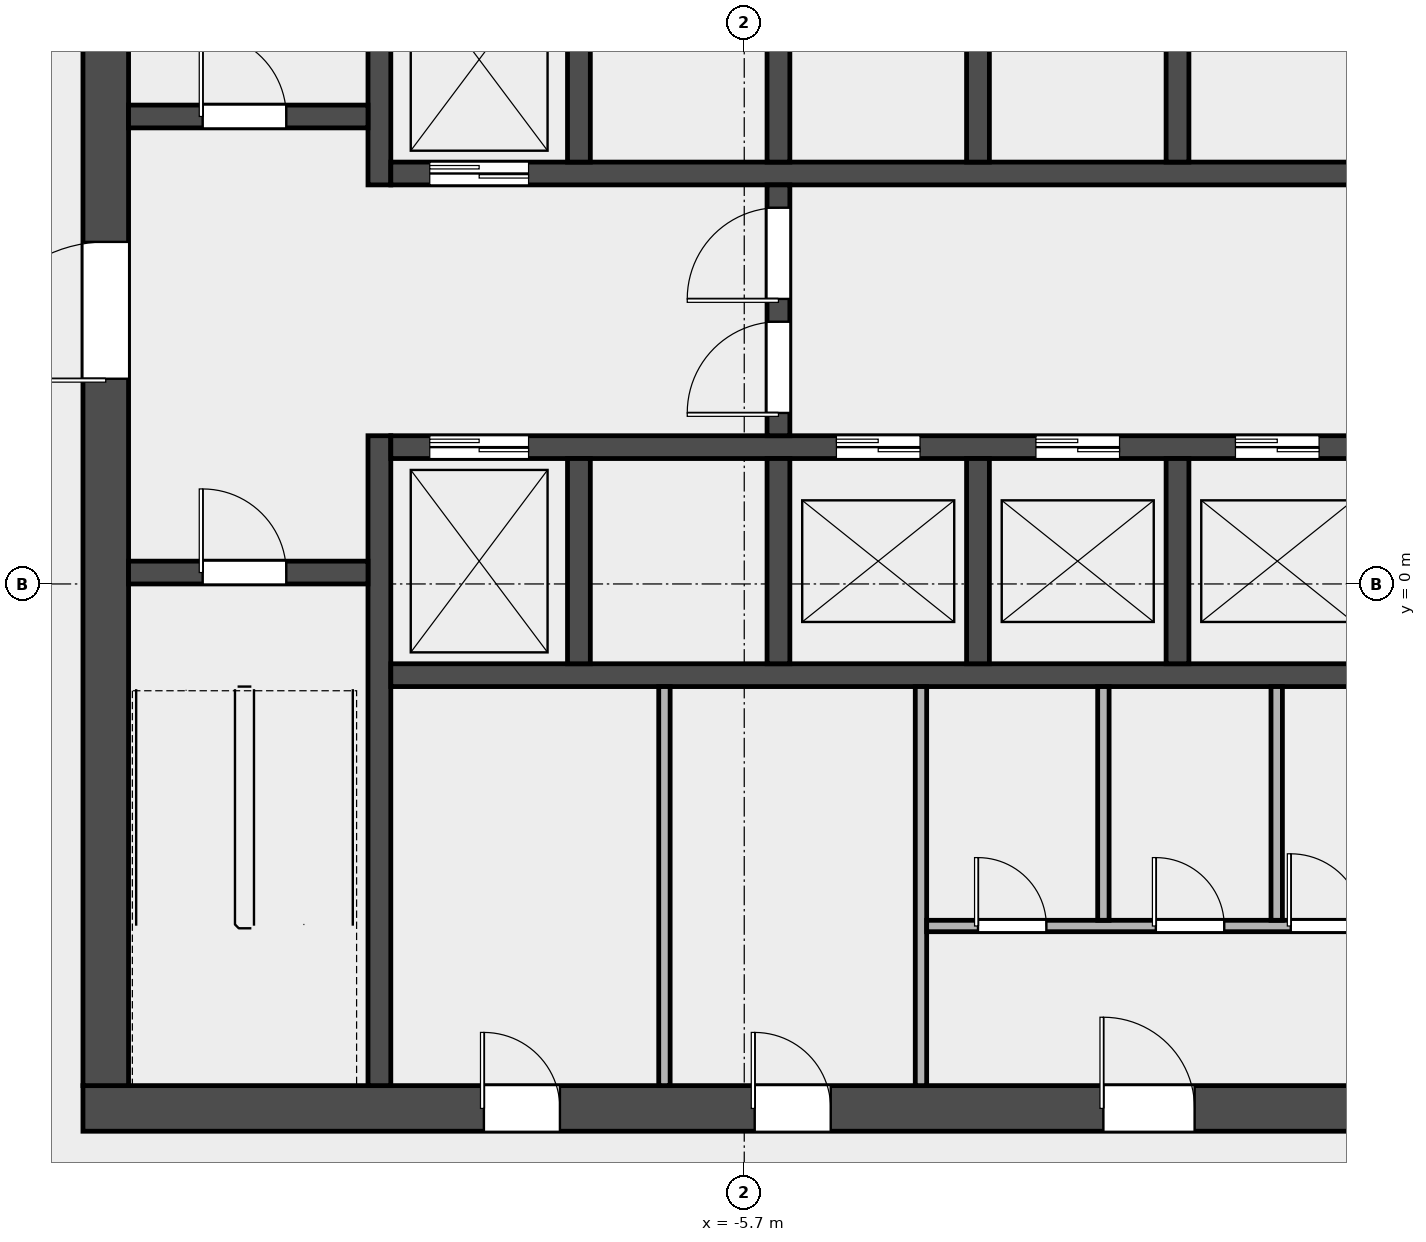
"""IFC4 building model, lengths in metres.
Left out: names, types, materials, properties, quantities, classifications, styles, units other than length and angle.
Written with IfcOpenShell. Run it as: python <this file> out.ifc"""

import sys

from ifc_helpers import new_model, si_unit, direction, frame, frame_2d, origin, place, context, subcontext, project, spatial, rectangle, extrude, element, fill, save


model = new_model("IFC4")
c1 = context("Model", 3, precision=1e-05, world=origin(), true_north=direction((0.0, 1.0)))
c2 = subcontext(c1, "Body", "Model", "MODEL_VIEW")
j1 = project(units=[si_unit("LENGTHUNIT", "METRE"), si_unit("PLANEANGLEUNIT", "RADIAN")], contexts=[c1])
p1 = place(None, origin())
s1 = spatial("IfcSite", under=j1, at=p1, CompositionType="ELEMENT")
p2 = place(p1, origin())
s2 = spatial("IfcBuilding", under=s1, at=p2, CompositionType="ELEMENT")
p3 = place(p2, frame((0.0, 0.0, 169.0)))
s3 = spatial("IfcBuildingStorey", under=s2, at=p3, CompositionType="ELEMENT", Elevation=169.0)
p4 = place(p3, frame((-14.4, -6.9, 0.0), z_axis=(0.0, 0.0, 1.0), x_axis=(1.0, 0.0, 0.0)))
e1 = element("IfcWall", 1, at=p4, inside=s3, PredefinedType="SHEAR", context=c2, shape_type="SweptSolid", body=[
    extrude(rectangle(XDim=28.8, YDim=0.6, at=frame_2d((14.4, 0.0))), origin(), (0.0, 0.0, 1.0), 3.7),
])
p5 = place(p4, frame((5.275, 0.0, 0.0)))
e2 = element("IfcOpeningElement", 2, at=p5, cuts=e1, PredefinedType="OPENING", context=c2, shape_type="SweptSolid", body=[
    extrude(rectangle(XDim=1.0, YDim=2.1, at=frame_2d((0.5, 1.05))), frame((0.0, 0.312, 0.0), z_axis=(0.0, -1.0, 0.0), x_axis=(1.0, 0.0, 0.0)), (0.0, 0.0, 1.0), 0.624),
])
p6 = place(p4, frame((8.837, 0.0, 0.0)))
e3 = element("IfcOpeningElement", 3, at=p6, cuts=e1, PredefinedType="OPENING", context=c2, shape_type="SweptSolid", body=[
    extrude(rectangle(XDim=1.0, YDim=2.1, at=frame_2d((0.5, 1.05))), frame((0.0, 0.312, 0.0), z_axis=(0.0, -1.0, 0.0), x_axis=(1.0, 0.0, 0.0)), (0.0, 0.0, 1.0), 0.624),
])
p7 = place(p4, frame((13.425, 0.0, 0.0)))
e4 = element("IfcOpeningElement", 4, at=p7, cuts=e1, PredefinedType="OPENING", context=c2, shape_type="SweptSolid", body=[
    extrude(rectangle(XDim=1.2, YDim=2.1, at=frame_2d((0.6, 1.05))), frame((0.0, 0.312, 0.0), z_axis=(0.0, -1.0, 0.0), x_axis=(1.0, 0.0, 0.0)), (0.0, 0.0, 1.0), 0.624),
])
p8 = place(p4, frame((18.75, 0.0, 0.0)))
e5 = element("IfcOpeningElement", 5, at=p8, cuts=e1, PredefinedType="OPENING", context=c2, shape_type="SweptSolid", body=[
    extrude(rectangle(XDim=1.8, YDim=2.1, at=frame_2d((0.9, 1.05))), frame((0.0, 0.312, 0.0), z_axis=(0.0, -1.0, 0.0), x_axis=(1.0, 0.0, 0.0)), (0.0, 0.0, 1.0), 0.624),
])
p9 = place(p4, frame((23.087, 0.0, 0.0)))
e6 = element("IfcOpeningElement", 6, at=p9, cuts=e1, PredefinedType="OPENING", context=c2, shape_type="SweptSolid", body=[
    extrude(rectangle(XDim=1.0, YDim=2.1, at=frame_2d((0.5, 1.05))), frame((0.0, 0.312, 0.0), z_axis=(0.0, -1.0, 0.0), x_axis=(1.0, 0.0, 0.0)), (0.0, 0.0, 1.0), 0.624),
])
p10 = place(p3, frame((-14.1, -6.6, 0.0), z_axis=(0.0, 0.0, 1.0), x_axis=(0.0, 1.0, 0.0)))
e7 = element("IfcWall", 7, at=p10, inside=s3, PredefinedType="SHEAR", context=c2, shape_type="SweptSolid", body=[
    extrude(rectangle(XDim=19.5, YDim=0.6, at=frame_2d((9.75, 0.0))), origin(), (0.0, 0.0, 1.0), 3.7),
])
p11 = place(p10, frame((9.3, 0.0, 0.0)))
e8 = element("IfcOpeningElement", 8, at=p11, cuts=e7, PredefinedType="OPENING", context=c2, shape_type="SweptSolid", body=[
    extrude(rectangle(XDim=1.8, YDim=2.1, at=frame_2d((0.9, 1.05))), frame((0.0, 0.312, 0.0), z_axis=(0.0, -1.0, 0.0), x_axis=(1.0, 0.0, 0.0)), (0.0, 0.0, 1.0), 0.624),
])
p12 = place(p3, frame((-10.5, -6.6, 0.0), z_axis=(0.0, 0.0, 1.0), x_axis=(0.0, 1.0, 0.0)))
e9 = element("IfcWall", 9, at=p12, inside=s3, PredefinedType="SHEAR", context=c2, shape_type="SweptSolid", body=[
    extrude(rectangle(XDim=8.55, YDim=0.3, at=frame_2d((4.275, 0.0))), origin(), (0.0, 0.0, 1.0), 3.7),
])
p13 = place(p3, frame((-10.5, 5.25, 0.0), z_axis=(0.0, 0.0, 1.0), x_axis=(0.0, 1.0, 0.0)))
e10 = element("IfcWall", 10, at=p13, inside=s3, PredefinedType="SHEAR", context=c2, shape_type="SweptSolid", body=[
    extrude(rectangle(XDim=7.65, YDim=0.3, at=frame_2d((3.825, 0.0))), origin(), (0.0, 0.0, 1.0), 3.7),
])
p14 = place(p3, frame((-13.8, 0.15, 0.0), z_axis=(0.0, 0.0, 1.0), x_axis=(1.0, 0.0, 0.0)))
e11 = element("IfcWall", 11, at=p14, inside=s3, PredefinedType="SOLIDWALL", context=c2, shape_type="SweptSolid", body=[
    extrude(rectangle(XDim=3.15, YDim=0.3, at=frame_2d((1.575, 0.0))), origin(), (0.0, 0.0, 1.0), 3.7),
])
p15 = place(p14, frame((0.975, 0.0, 0.0)))
e12 = element("IfcOpeningElement", 12, at=p15, cuts=e11, PredefinedType="OPENING", context=c2, shape_type="SweptSolid", body=[
    extrude(rectangle(XDim=1.1, YDim=2.1, at=frame_2d((0.55, 1.05))), frame((0.0, 0.162, 0.0), z_axis=(0.0, -1.0, 0.0), x_axis=(1.0, 0.0, 0.0)), (0.0, 0.0, 1.0), 0.324),
])
p16 = place(p3, frame((-13.8, 6.15, 0.0), z_axis=(0.0, 0.0, 1.0), x_axis=(1.0, 0.0, 0.0)))
e13 = element("IfcWall", 13, at=p16, inside=s3, PredefinedType="SOLIDWALL", context=c2, shape_type="SweptSolid", body=[
    extrude(rectangle(XDim=3.15, YDim=0.3, at=frame_2d((1.575, 0.0))), origin(), (0.0, 0.0, 1.0), 3.7),
])
p17 = place(p16, frame((0.975, 0.0, 0.0)))
e14 = element("IfcOpeningElement", 14, at=p17, cuts=e13, PredefinedType="OPENING", context=c2, shape_type="SweptSolid", body=[
    extrude(rectangle(XDim=1.1, YDim=2.1, at=frame_2d((0.55, 1.05))), frame((0.0, 0.162, 0.0), z_axis=(0.0, -1.0, 0.0), x_axis=(1.0, 0.0, 0.0)), (0.0, 0.0, 1.0), 0.324),
])
p18 = place(p3, frame((-10.35, -1.2, 0.0), z_axis=(0.0, 0.0, 1.0), x_axis=(1.0, 0.0, 0.0)))
e15 = element("IfcWall", 15, at=p18, inside=s3, PredefinedType="SOLIDWALL", context=c2, shape_type="SweptSolid", body=[
    extrude(rectangle(XDim=20.7, YDim=0.3, at=frame_2d((10.35, 0.0))), origin(), (0.0, 0.0, 1.0), 3.7),
])
p19 = place(p3, frame((-10.35, 1.8, 0.0), z_axis=(0.0, 0.0, 1.0), x_axis=(1.0, 0.0, 0.0)))
e16 = element("IfcWall", 16, at=p19, inside=s3, PredefinedType="SOLIDWALL", context=c2, shape_type="SweptSolid", body=[
    extrude(rectangle(XDim=20.7, YDim=0.3, at=frame_2d((10.35, 0.0))), origin(), (0.0, 0.0, 1.0), 3.7),
])
p20 = place(p19, frame((0.512, 0.0, 0.0)))
e17 = element("IfcOpeningElement", 17, at=p20, cuts=e16, PredefinedType="OPENING", context=c2, shape_type="SweptSolid", body=[
    extrude(rectangle(XDim=1.3, YDim=2.1, at=frame_2d((0.65, 1.05))), frame((0.0, 0.162, 0.0), z_axis=(0.0, -1.0, 0.0), x_axis=(1.0, 0.0, 0.0)), (0.0, 0.0, 1.0), 0.324),
])
p21 = place(p19, frame((5.863, 0.0, 0.0)))
e18 = element("IfcOpeningElement", 18, at=p21, cuts=e16, PredefinedType="OPENING", context=c2, shape_type="SweptSolid", body=[
    extrude(rectangle(XDim=1.1, YDim=2.1, at=frame_2d((0.55, 1.05))), frame((0.0, 0.162, 0.0), z_axis=(0.0, -1.0, 0.0), x_axis=(1.0, 0.0, 0.0)), (0.0, 0.0, 1.0), 0.324),
])
p22 = place(p19, frame((8.488, 0.0, 0.0)))
e19 = element("IfcOpeningElement", 19, at=p22, cuts=e16, PredefinedType="OPENING", context=c2, shape_type="SweptSolid", body=[
    extrude(rectangle(XDim=1.1, YDim=2.1, at=frame_2d((0.55, 1.05))), frame((0.0, 0.162, 0.0), z_axis=(0.0, -1.0, 0.0), x_axis=(1.0, 0.0, 0.0)), (0.0, 0.0, 1.0), 0.324),
])
p23 = place(p19, frame((11.113, 0.0, 0.0)))
e20 = element("IfcOpeningElement", 20, at=p23, cuts=e16, PredefinedType="OPENING", context=c2, shape_type="SweptSolid", body=[
    extrude(rectangle(XDim=1.1, YDim=2.1, at=frame_2d((0.55, 1.05))), frame((0.0, 0.162, 0.0), z_axis=(0.0, -1.0, 0.0), x_axis=(1.0, 0.0, 0.0)), (0.0, 0.0, 1.0), 0.324),
])
p24 = place(p19, frame((13.738, 0.0, 0.0)))
e21 = element("IfcOpeningElement", 21, at=p24, cuts=e16, PredefinedType="OPENING", context=c2, shape_type="SweptSolid", body=[
    extrude(rectangle(XDim=1.1, YDim=2.1, at=frame_2d((0.55, 1.05))), frame((0.0, 0.162, 0.0), z_axis=(0.0, -1.0, 0.0), x_axis=(1.0, 0.0, 0.0)), (0.0, 0.0, 1.0), 0.324),
])
p25 = place(p19, frame((16.363, 0.0, 0.0)))
e22 = element("IfcOpeningElement", 22, at=p25, cuts=e16, PredefinedType="OPENING", context=c2, shape_type="SweptSolid", body=[
    extrude(rectangle(XDim=1.1, YDim=2.1, at=frame_2d((0.55, 1.05))), frame((0.0, 0.162, 0.0), z_axis=(0.0, -1.0, 0.0), x_axis=(1.0, 0.0, 0.0)), (0.0, 0.0, 1.0), 0.324),
])
p26 = place(p19, frame((18.988, 0.0, 0.0)))
e23 = element("IfcOpeningElement", 23, at=p26, cuts=e16, PredefinedType="OPENING", context=c2, shape_type="SweptSolid", body=[
    extrude(rectangle(XDim=1.1, YDim=2.1, at=frame_2d((0.55, 1.05))), frame((0.0, 0.162, 0.0), z_axis=(0.0, -1.0, 0.0), x_axis=(1.0, 0.0, 0.0)), (0.0, 0.0, 1.0), 0.324),
])
p27 = place(p3, frame((-10.35, 5.4, 0.0), z_axis=(0.0, 0.0, 1.0), x_axis=(1.0, 0.0, 0.0)))
e24 = element("IfcWall", 24, at=p27, inside=s3, PredefinedType="SOLIDWALL", context=c2, shape_type="SweptSolid", body=[
    extrude(rectangle(XDim=20.7, YDim=0.3, at=frame_2d((10.35, 0.0))), origin(), (0.0, 0.0, 1.0), 3.7),
])
p28 = place(p27, frame((0.512, 0.0, 0.0)))
e25 = element("IfcOpeningElement", 25, at=p28, cuts=e24, PredefinedType="OPENING", context=c2, shape_type="SweptSolid", body=[
    extrude(rectangle(XDim=1.3, YDim=2.1, at=frame_2d((0.65, 1.05))), frame((0.0, 0.162, 0.0), z_axis=(0.0, -1.0, 0.0), x_axis=(1.0, 0.0, 0.0)), (0.0, 0.0, 1.0), 0.324),
])
for number, where, z_axis, x_axis in (
    (26, (-7.875, -1.05, 0.0), (0.0, 0.0, 1.0), (0.0, 1.0, 0.0)),
    (27, (-5.25, -1.05, 0.0), (0.0, 0.0, 1.0), (0.0, 1.0, 0.0)),
    (28, (-2.625, -1.05, 0.0), (0.0, 0.0, 1.0), (0.0, 1.0, 0.0)),
    (29, (0.0, -1.05, 0.0), (0.0, 0.0, 1.0), (0.0, 1.0, 0.0)),
    (30, (-7.875, 5.55, 0.0), (0.0, 0.0, 1.0), (0.0, 1.0, 0.0)),
    (31, (-5.25, 5.55, 0.0), (0.0, 0.0, 1.0), (0.0, 1.0, 0.0)),
    (32, (-2.625, 5.55, 0.0), (0.0, 0.0, 1.0), (0.0, 1.0, 0.0)),
    (33, (0.0, 5.55, 0.0), (0.0, 0.0, 1.0), (0.0, 1.0, 0.0)),
):
    element("IfcWall", number, at=place(p3, frame(where, z_axis=z_axis, x_axis=x_axis)), inside=s3, PredefinedType="SOLIDWALL", context=c2, shape_type="SweptSolid", body=[
        extrude(rectangle(XDim=2.7, YDim=0.3, at=frame_2d((1.35, 0.0))), origin(), (0.0, 0.0, 1.0), 3.7),
    ])
p29 = place(p3, frame((-5.25, 1.95, 0.0), z_axis=(0.0, 0.0, 1.0), x_axis=(0.0, 1.0, 0.0)))
e34 = element("IfcWall", 34, at=p29, inside=s3, PredefinedType="SOLIDWALL", context=c2, shape_type="SweptSolid", body=[
    extrude(rectangle(XDim=3.3, YDim=0.3, at=frame_2d((1.65, 0.0))), origin(), (0.0, 0.0, 1.0), 3.7),
])
p30 = place(p29, frame((0.3, 0.0, 0.0)))
e35 = element("IfcOpeningElement", 35, at=p30, cuts=e34, PredefinedType="OPENING", context=c2, shape_type="SweptSolid", body=[
    extrude(rectangle(XDim=1.2, YDim=2.1, at=frame_2d((0.6, 1.05))), frame((0.0, 0.162, 0.0), z_axis=(0.0, -1.0, 0.0), x_axis=(1.0, 0.0, 0.0)), (0.0, 0.0, 1.0), 0.324),
])
p31 = place(p29, frame((1.8, 0.0, 0.0)))
e36 = element("IfcOpeningElement", 36, at=p31, cuts=e34, PredefinedType="OPENING", context=c2, shape_type="SweptSolid", body=[
    extrude(rectangle(XDim=1.2, YDim=2.1, at=frame_2d((0.6, 1.05))), frame((0.0, 0.162, 0.0), z_axis=(0.0, -1.0, 0.0), x_axis=(1.0, 0.0, 0.0)), (0.0, 0.0, 1.0), 0.324),
])
for number, where, z_axis, x_axis in (
    (37, (-6.75, -6.6, 0.0), (0.0, 0.0, 1.0), (0.0, 1.0, 0.0)),
    (38, (-3.375, -6.6, 0.0), (0.0, 0.0, 1.0), (0.0, 1.0, 0.0)),
):
    element("IfcWall", number, at=place(p3, frame(where, z_axis=z_axis, x_axis=x_axis)), inside=s3, PredefinedType="PARTITIONING", context=c2, shape_type="SweptSolid", body=[
        extrude(rectangle(XDim=5.25, YDim=0.15, at=frame_2d((2.625, 0.0))), origin(), (0.0, 0.0, 1.0), 3.7),
    ])
p32 = place(p3, frame((-3.3, -4.5, 0.0), z_axis=(0.0, 0.0, 1.0), x_axis=(1.0, 0.0, 0.0)))
e39 = element("IfcWall", 39, at=p32, inside=s3, PredefinedType="PARTITIONING", context=c2, shape_type="SweptSolid", body=[
    extrude(rectangle(XDim=5.775, YDim=0.15, at=frame_2d((2.888, 0.0))), origin(), (0.0, 0.0, 1.0), 3.7),
])
p33 = place(p32, frame((0.675, 0.0, 0.0)))
e40 = element("IfcOpeningElement", 40, at=p33, cuts=e39, PredefinedType="OPENING", context=c2, shape_type="SweptSolid", body=[
    extrude(rectangle(XDim=0.9, YDim=2.1, at=frame_2d((0.45, 1.05))), frame((0.0, 0.087, 0.0), z_axis=(0.0, -1.0, 0.0), x_axis=(1.0, 0.0, 0.0)), (0.0, 0.0, 1.0), 0.174),
])
p34 = place(p32, frame((3.015, 0.0, 0.0)))
e41 = element("IfcOpeningElement", 41, at=p34, cuts=e39, PredefinedType="OPENING", context=c2, shape_type="SweptSolid", body=[
    extrude(rectangle(XDim=0.9, YDim=2.1, at=frame_2d((0.45, 1.05))), frame((0.0, 0.087, 0.0), z_axis=(0.0, -1.0, 0.0), x_axis=(1.0, 0.0, 0.0)), (0.0, 0.0, 1.0), 0.174),
])
p35 = place(p32, frame((4.79, 0.0, 0.0)))
e42 = element("IfcOpeningElement", 42, at=p35, cuts=e39, PredefinedType="OPENING", context=c2, shape_type="SweptSolid", body=[
    extrude(rectangle(XDim=0.95, YDim=2.1, at=frame_2d((0.475, 1.05))), frame((0.0, 0.087, 0.0), z_axis=(0.0, -1.0, 0.0), x_axis=(1.0, 0.0, 0.0)), (0.0, 0.0, 1.0), 0.174),
])
for number, where, z_axis, x_axis in (
    (43, (-0.975, -4.425, 0.0), (0.0, 0.0, 1.0), (0.0, 1.0, 0.0)),
    (44, (1.305, -4.425, 0.0), (0.0, 0.0, 1.0), (0.0, 1.0, 0.0)),
):
    element("IfcWall", number, at=place(p3, frame(where, z_axis=z_axis, x_axis=x_axis)), inside=s3, PredefinedType="PARTITIONING", context=c2, shape_type="SweptSolid", body=[
        extrude(rectangle(XDim=3.075, YDim=0.15, at=frame_2d((1.538, 0.0))), origin(), (0.0, 0.0, 1.0), 3.7),
    ])
p36 = place(p15, origin())
e45 = element("IfcDoor", 45, at=p36, inside=s3, OperationType="SINGLE_SWING_LEFT", PredefinedType="DOOR", context=c2, shape_type="SweptSolid", body=[
    extrude(rectangle(XDim=1.1, YDim=2.1, at=frame_2d((0.55, 1.05))), frame((0.0, 0.025, 0.0), z_axis=(0.0, -1.0, 0.0), x_axis=(1.0, 0.0, 0.0)), (0.0, 0.0, 1.0), 0.05),
])
fill(e12, e45)
p37 = place(p17, origin())
e46 = element("IfcDoor", 46, at=p37, inside=s3, OperationType="SINGLE_SWING_LEFT", PredefinedType="DOOR", context=c2, shape_type="SweptSolid", body=[
    extrude(rectangle(XDim=1.1, YDim=2.1, at=frame_2d((0.55, 1.05))), frame((0.0, 0.025, 0.0), z_axis=(0.0, -1.0, 0.0), x_axis=(1.0, 0.0, 0.0)), (0.0, 0.0, 1.0), 0.05),
])
fill(e14, e46)
p38 = place(p11, origin())
e47 = element("IfcDoor", 47, at=p38, inside=s3, OperationType="DOUBLE_DOOR_SINGLE_SWING", PredefinedType="DOOR", context=c2, shape_type="SweptSolid", body=[
    extrude(rectangle(XDim=1.8, YDim=2.1, at=frame_2d((0.9, 1.05))), frame((0.0, 0.025, 0.0), z_axis=(0.0, -1.0, 0.0), x_axis=(1.0, 0.0, 0.0)), (0.0, 0.0, 1.0), 0.05),
])
fill(e8, e47)
p39 = place(p30, origin())
e48 = element("IfcDoor", 48, at=p39, inside=s3, OperationType="SINGLE_SWING_LEFT", PredefinedType="DOOR", context=c2, shape_type="SweptSolid", body=[
    extrude(rectangle(XDim=1.2, YDim=2.1, at=frame_2d((0.6, 1.05))), frame((0.0, 0.025, 0.0), z_axis=(0.0, -1.0, 0.0), x_axis=(1.0, 0.0, 0.0)), (0.0, 0.0, 1.0), 0.05),
])
fill(e35, e48)
p40 = place(p31, origin())
e49 = element("IfcDoor", 49, at=p40, inside=s3, OperationType="SINGLE_SWING_RIGHT", PredefinedType="DOOR", context=c2, shape_type="SweptSolid", body=[
    extrude(rectangle(XDim=1.2, YDim=2.1, at=frame_2d((0.6, 1.05))), frame((0.0, 0.025, 0.0), z_axis=(0.0, -1.0, 0.0), x_axis=(1.0, 0.0, 0.0)), (0.0, 0.0, 1.0), 0.05),
])
fill(e36, e49)
p41 = place(p20, origin())
e50 = element("IfcDoor", 50, at=p41, inside=s3, OperationType="DOUBLE_DOOR_SLIDING", PredefinedType="DOOR", context=c2, shape_type="SweptSolid", body=[
    extrude(rectangle(XDim=1.3, YDim=2.1, at=frame_2d((0.65, 1.05))), frame((0.0, 0.025, 0.0), z_axis=(0.0, -1.0, 0.0), x_axis=(1.0, 0.0, 0.0)), (0.0, 0.0, 1.0), 0.05),
])
fill(e17, e50)
p42 = place(p21, origin())
e51 = element("IfcDoor", 51, at=p42, inside=s3, OperationType="DOUBLE_DOOR_SLIDING", PredefinedType="DOOR", context=c2, shape_type="SweptSolid", body=[
    extrude(rectangle(XDim=1.1, YDim=2.1, at=frame_2d((0.55, 1.05))), frame((0.0, 0.025, 0.0), z_axis=(0.0, -1.0, 0.0), x_axis=(1.0, 0.0, 0.0)), (0.0, 0.0, 1.0), 0.05),
])
fill(e18, e51)
p43 = place(p22, origin())
e52 = element("IfcDoor", 52, at=p43, inside=s3, OperationType="DOUBLE_DOOR_SLIDING", PredefinedType="DOOR", context=c2, shape_type="SweptSolid", body=[
    extrude(rectangle(XDim=1.1, YDim=2.1, at=frame_2d((0.55, 1.05))), frame((0.0, 0.025, 0.0), z_axis=(0.0, -1.0, 0.0), x_axis=(1.0, 0.0, 0.0)), (0.0, 0.0, 1.0), 0.05),
])
fill(e19, e52)
p44 = place(p23, origin())
e53 = element("IfcDoor", 53, at=p44, inside=s3, OperationType="DOUBLE_DOOR_SLIDING", PredefinedType="DOOR", context=c2, shape_type="SweptSolid", body=[
    extrude(rectangle(XDim=1.1, YDim=2.1, at=frame_2d((0.55, 1.05))), frame((0.0, 0.025, 0.0), z_axis=(0.0, -1.0, 0.0), x_axis=(1.0, 0.0, 0.0)), (0.0, 0.0, 1.0), 0.05),
])
fill(e20, e53)
p45 = place(p28, origin())
e54 = element("IfcDoor", 54, at=p45, inside=s3, OperationType="DOUBLE_DOOR_SLIDING", PredefinedType="DOOR", context=c2, shape_type="SweptSolid", body=[
    extrude(rectangle(XDim=1.3, YDim=2.1, at=frame_2d((0.65, 1.05))), frame((0.0, 0.025, 0.0), z_axis=(0.0, -1.0, 0.0), x_axis=(1.0, 0.0, 0.0)), (0.0, 0.0, 1.0), 0.05),
])
fill(e25, e54)
p46 = place(p5, origin())
e55 = element("IfcDoor", 55, at=p46, inside=s3, OperationType="SINGLE_SWING_LEFT", PredefinedType="DOOR", context=c2, shape_type="SweptSolid", body=[
    extrude(rectangle(XDim=1.0, YDim=2.1, at=frame_2d((0.5, 1.05))), frame((0.0, 0.025, 0.0), z_axis=(0.0, -1.0, 0.0), x_axis=(1.0, 0.0, 0.0)), (0.0, 0.0, 1.0), 0.05),
])
fill(e2, e55)
p47 = place(p6, origin())
e56 = element("IfcDoor", 56, at=p47, inside=s3, OperationType="SINGLE_SWING_LEFT", PredefinedType="DOOR", context=c2, shape_type="SweptSolid", body=[
    extrude(rectangle(XDim=1.0, YDim=2.1, at=frame_2d((0.5, 1.05))), frame((0.0, 0.025, 0.0), z_axis=(0.0, -1.0, 0.0), x_axis=(1.0, 0.0, 0.0)), (0.0, 0.0, 1.0), 0.05),
])
fill(e3, e56)
p48 = place(p7, origin())
e57 = element("IfcDoor", 57, at=p48, inside=s3, OperationType="SINGLE_SWING_LEFT", PredefinedType="DOOR", context=c2, shape_type="SweptSolid", body=[
    extrude(rectangle(XDim=1.2, YDim=2.1, at=frame_2d((0.6, 1.05))), frame((0.0, 0.025, 0.0), z_axis=(0.0, -1.0, 0.0), x_axis=(1.0, 0.0, 0.0)), (0.0, 0.0, 1.0), 0.05),
])
fill(e4, e57)
p49 = place(p33, origin())
e58 = element("IfcDoor", 58, at=p49, inside=s3, OperationType="SINGLE_SWING_LEFT", PredefinedType="DOOR", context=c2, shape_type="SweptSolid", body=[
    extrude(rectangle(XDim=0.9, YDim=2.1, at=frame_2d((0.45, 1.05))), frame((0.0, 0.025, 0.0), z_axis=(0.0, -1.0, 0.0), x_axis=(1.0, 0.0, 0.0)), (0.0, 0.0, 1.0), 0.05),
])
fill(e40, e58)
p50 = place(p34, origin())
e59 = element("IfcDoor", 59, at=p50, inside=s3, OperationType="SINGLE_SWING_LEFT", PredefinedType="DOOR", context=c2, shape_type="SweptSolid", body=[
    extrude(rectangle(XDim=0.9, YDim=2.1, at=frame_2d((0.45, 1.05))), frame((0.0, 0.025, 0.0), z_axis=(0.0, -1.0, 0.0), x_axis=(1.0, 0.0, 0.0)), (0.0, 0.0, 1.0), 0.05),
])
fill(e41, e59)
p51 = place(p35, origin())
e60 = element("IfcDoor", 60, at=p51, inside=s3, OperationType="SINGLE_SWING_LEFT", PredefinedType="DOOR", context=c2, shape_type="SweptSolid", body=[
    extrude(rectangle(XDim=0.95, YDim=2.1, at=frame_2d((0.475, 1.05))), frame((0.0, 0.025, 0.0), z_axis=(0.0, -1.0, 0.0), x_axis=(1.0, 0.0, 0.0)), (0.0, 0.0, 1.0), 0.05),
])
fill(e42, e60)
save(model, sys.argv[1])
